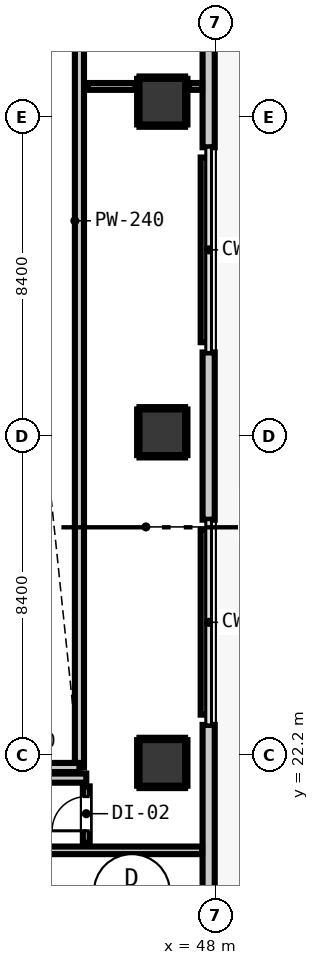
"""IFC4 building model, lengths in metres.
Left out: names, types, materials, properties, quantities, classifications, styles, units other than length and angle.
Written with IfcOpenShell. Run it as: python <this file> out.ifc"""

import sys

from ifc_helpers import new_model, si_unit, direction, frame, frame_2d, origin, origin_2d, place, context, subcontext, project, spatial, rectangle, circle, extrude, element, fill, save


model = new_model("IFC4")
c1 = context("Model", 3, precision=1e-05, world=origin(), true_north=direction((0.0, 1.0)))
c2 = subcontext(c1, "Body", "Model", "MODEL_VIEW")
j1 = project(units=[si_unit("LENGTHUNIT", "METRE"), si_unit("PLANEANGLEUNIT", "RADIAN")], contexts=[c1])
p1 = place(None, origin())
s1 = spatial("IfcSite", under=j1, at=p1, CompositionType="ELEMENT")
p2 = place(p1, origin())
s2 = spatial("IfcBuilding", under=s1, at=p2, CompositionType="ELEMENT")
p3 = place(p2, origin())
s3 = spatial("IfcBuildingStorey", under=s2, at=p3, CompositionType="ELEMENT", Elevation=0.0)
for number, where, z_axis, x_axis in (
    (1, (46.6, 22.0, 0.0), (0.0, 0.0, 1.0), (1.0, 0.0, 0.0)),
    (2, (46.6, 30.7, 0.0), (0.0, 0.0, 1.0), (1.0, 0.0, 0.0)),
    (3, (46.6, 39.4, 0.0), (0.0, 0.0, 1.0), (1.0, 0.0, 0.0)),
):
    element("IfcColumn", number, at=place(p3, frame(where, z_axis=z_axis, x_axis=x_axis)), inside=s3, PredefinedType="COLUMN", context=c2, shape_type="SweptSolid", body=[
        extrude(circle(Radius=0.6, at=origin_2d()), origin(), (0.0, 0.0, 1.0), 5.2),
    ])
p4 = place(p3, frame((47.82, 48.52, 0.0), z_axis=(0.0, 0.0, 1.0), x_axis=(0.0, -1.0, 0.0)))
e4 = element("IfcWall", 4, at=p4, inside=s3, PredefinedType="STANDARD", context=c2, shape_type="SweptSolid", body=[
    extrude(rectangle(XDim=10.32, YDim=0.32, at=frame_2d((5.16, 0.0))), origin(), (0.0, 0.0, 1.0), 4.92),
])
p5 = place(p3, frame((47.82, 32.8, 0.0), z_axis=(0.0, 0.0, 1.0), x_axis=(0.0, -1.0, 0.0)))
e5 = element("IfcWall", 5, at=p5, inside=s3, PredefinedType="STANDARD", context=c2, shape_type="SweptSolid", body=[
    extrude(rectangle(XDim=4.4, YDim=0.32, at=frame_2d((2.2, 0.0))), origin(), (0.0, 0.0, 1.0), 4.92),
])
p6 = place(p3, frame((47.82, 23.0, 0.0), z_axis=(0.0, 0.0, 1.0), x_axis=(0.0, -1.0, 0.0)))
e6 = element("IfcWall", 6, at=p6, inside=s3, PredefinedType="STANDARD", context=c2, shape_type="SweptSolid", body=[
    extrude(rectangle(XDim=10.32, YDim=0.32, at=frame_2d((5.16, 0.0))), origin(), (0.0, 0.0, 1.0), 4.92),
])
p7 = place(p6, frame((6.2, 0.0, 0.0)))
e7 = element("IfcOpeningElement", 7, at=p7, cuts=e6, PredefinedType="OPENING", context=c2, shape_type="SweptSolid", body=[
    extrude(rectangle(XDim=1.8, YDim=2.4, at=frame_2d((0.9, 1.2))), frame((0.0, 0.17, 0.0), z_axis=(0.0, -1.0, 0.0), x_axis=(1.0, 0.0, 0.0)), (0.0, 0.0, 1.0), 0.34),
])
p8 = place(p3, frame((44.42, 21.88, 0.0), z_axis=(0.0, 0.0, 1.0), x_axis=(0.0, 1.0, 0.0)))
e8 = element("IfcWall", 8, at=p8, inside=s3, PredefinedType="PARAPET", context=c2, shape_type="SweptSolid", body=[
    extrude(rectangle(XDim=28.77, YDim=0.24, at=frame_2d((14.385, 0.0))), origin(), (0.0, 0.0, 1.0), 1.2),
])
p9 = place(p3, frame((41.38, 21.88, 0.0), z_axis=(0.0, 0.0, 1.0), x_axis=(1.0, 0.0, 0.0)))
e9 = element("IfcWall", 9, at=p9, inside=s3, PredefinedType="PARAPET", context=c2, shape_type="SweptSolid", body=[
    extrude(rectangle(XDim=3.04, YDim=0.24, at=frame_2d((1.52, 0.0))), origin(), (0.0, 0.0, 1.0), 1.2),
])
p10 = place(p3, frame((44.6, 21.6, 0.0), z_axis=(0.0, 0.0, 1.0), x_axis=(-1.0, 0.0, 0.0)))
e10 = element("IfcWall", 10, at=p10, inside=s3, PredefinedType="PARTITIONING", context=c2, shape_type="SweptSolid", body=[
    extrude(rectangle(XDim=7.81, YDim=0.24, at=frame_2d((3.905, 0.0))), origin(), (0.0, 0.0, 1.0), 4.155),
])
p11 = place(p10, frame((5.65, 0.0, 0.0)))
e11 = element("IfcOpeningElement", 11, at=p11, cuts=e10, PredefinedType="OPENING", context=c2, shape_type="SweptSolid", body=[
    extrude(rectangle(XDim=1.4, YDim=2.15, at=frame_2d((0.7, 1.075))), frame((0.0, 0.13, 0.0), z_axis=(0.0, -1.0, 0.0), x_axis=(1.0, 0.0, 0.0)), (0.0, 0.0, 1.0), 0.26),
])
p12 = place(p3, frame((4.352, 19.7, 0.0), z_axis=(0.0, 0.0, 1.0), x_axis=(1.0, 0.0, 0.0)))
e12 = element("IfcWall", 12, at=p12, inside=s3, PredefinedType="PARTITIONING", context=c2, shape_type="SweptSolid", body=[
    extrude(rectangle(XDim=43.296, YDim=0.2, at=frame_2d((21.648, 0.0))), origin(), (0.0, 0.0, 1.0), 4.92),
])
p13 = place(p12, frame((19.823, 0.0, 0.0)))
e13 = element("IfcOpeningElement", 13, at=p13, cuts=e12, PredefinedType="OPENING", context=c2, shape_type="SweptSolid", body=[
    extrude(rectangle(XDim=1.4, YDim=2.15, at=frame_2d((0.7, 1.075))), frame((0.0, 0.11, 0.0), z_axis=(0.0, -1.0, 0.0), x_axis=(1.0, 0.0, 0.0)), (0.0, 0.0, 1.0), 0.22),
])
p14 = place(p12, frame((36.848, 0.0, 0.0)))
e14 = element("IfcOpeningElement", 14, at=p14, cuts=e12, PredefinedType="OPENING", context=c2, shape_type="SweptSolid", body=[
    extrude(rectangle(XDim=1.4, YDim=2.15, at=frame_2d((0.7, 1.075))), frame((0.0, 0.11, 0.0), z_axis=(0.0, -1.0, 0.0), x_axis=(1.0, 0.0, 0.0)), (0.0, 0.0, 1.0), 0.22),
])
p15 = place(p3, frame((44.638, 39.8, 0.0), z_axis=(0.0, 0.0, 1.0), x_axis=(1.0, 0.0, 0.0)))
e15 = element("IfcWall", 15, at=p15, inside=s3, PredefinedType="PARTITIONING", context=c2, shape_type="SweptSolid", body=[
    extrude(rectangle(XDim=1.26, YDim=0.18, at=frame_2d((0.63, 0.0))), origin(), (0.0, 0.0, 1.0), 4.155),
])
p16 = place(p3, frame((47.302, 39.8, 0.0), z_axis=(0.0, 0.0, 1.0), x_axis=(1.0, 0.0, 0.0)))
e16 = element("IfcWall", 16, at=p16, inside=s3, PredefinedType="PARTITIONING", context=c2, shape_type="SweptSolid", body=[
    extrude(rectangle(XDim=0.346, YDim=0.18, at=frame_2d((0.173, 0.0))), origin(), (0.0, 0.0, 1.0), 4.92),
])
p17 = place(p3, frame((44.6, 19.898, 0.0), z_axis=(0.0, 0.0, 1.0), x_axis=(0.0, 1.0, 0.0)))
e17 = element("IfcWall", 17, at=p17, inside=s3, PredefinedType="PARTITIONING", context=c2, shape_type="SweptSolid", body=[
    extrude(rectangle(XDim=1.484, YDim=0.18, at=frame_2d((0.742, 0.0))), origin(), (0.0, 0.0, 1.0), 4.92),
])
p18 = place(p17, frame((0.316, 0.0, 0.0)))
e18 = element("IfcOpeningElement", 18, at=p18, cuts=e17, PredefinedType="OPENING", context=c2, shape_type="SweptSolid", body=[
    extrude(rectangle(XDim=0.9, YDim=2.1, at=frame_2d((0.45, 1.05))), frame((0.0, 0.1, 0.0), z_axis=(0.0, -1.0, 0.0), x_axis=(1.0, 0.0, 0.0)), (0.0, 0.0, 1.0), 0.2),
])
for number, where, z_axis, x_axis in (
    (19, (47.7, 23.27, 0.0), (0.0, 0.0, 1.0), (0.0, 1.0, 0.0)),
    (20, (47.7, 33.07, 0.0), (0.0, 0.0, 1.0), (0.0, 1.0, 0.0)),
):
    element("IfcWall", number, at=place(p3, frame(where, z_axis=z_axis, x_axis=x_axis)), inside=s3, PredefinedType="PARTITIONING", context=c2, shape_type="SweptSolid", body=[
        extrude(rectangle(XDim=4.86, YDim=0.18, at=frame_2d((2.43, 0.0))), origin(), (0.0, 0.0, 1.0), 4.92),
    ])
for number, where, z_axis, x_axis in (
    (21, (46.0, 21.368, 0.0), (0.0, 0.0, 1.0), (1.0, 0.0, 0.0)),
    (22, (46.0, 22.632, 0.0), (0.0, 0.0, 1.0), (1.0, 0.0, 0.0)),
):
    element("IfcWall", number, at=place(p3, frame(where, z_axis=z_axis, x_axis=x_axis)), inside=s3, PredefinedType="PARTITIONING", context=c2, shape_type="SweptSolid", body=[
        extrude(rectangle(XDim=1.2, YDim=0.06, at=frame_2d((0.6, 0.0))), origin(), (0.0, 0.0, 1.0), 1.45),
    ])
for number, where, z_axis, x_axis in (
    (23, (45.968, 21.4, 0.0), (0.0, 0.0, 1.0), (0.0, 1.0, 0.0)),
    (24, (47.232, 21.4, 0.0), (0.0, 0.0, 1.0), (0.0, 1.0, 0.0)),
):
    element("IfcWall", number, at=place(p3, frame(where, z_axis=z_axis, x_axis=x_axis)), inside=s3, PredefinedType="PARTITIONING", context=c2, shape_type="SweptSolid", body=[
        extrude(rectangle(XDim=1.2, YDim=0.06, at=frame_2d((0.6, 0.0))), origin(), (0.0, 0.0, 1.0), 1.45),
    ])
for number, where, z_axis, x_axis in (
    (25, (46.0, 30.068, 0.0), (0.0, 0.0, 1.0), (1.0, 0.0, 0.0)),
    (26, (46.0, 31.332, 0.0), (0.0, 0.0, 1.0), (1.0, 0.0, 0.0)),
    (27, (45.968, 30.1, 0.0), (0.0, 0.0, 1.0), (0.0, 1.0, 0.0)),
    (28, (47.232, 30.1, 0.0), (0.0, 0.0, 1.0), (0.0, 1.0, 0.0)),
    (29, (46.0, 38.768, 0.0), (0.0, 0.0, 1.0), (1.0, 0.0, 0.0)),
    (30, (46.0, 40.032, 0.0), (0.0, 0.0, 1.0), (1.0, 0.0, 0.0)),
    (31, (45.968, 38.8, 0.0), (0.0, 0.0, 1.0), (0.0, 1.0, 0.0)),
    (32, (47.232, 38.8, 0.0), (0.0, 0.0, 1.0), (0.0, 1.0, 0.0)),
):
    element("IfcWall", number, at=place(p3, frame(where, z_axis=z_axis, x_axis=x_axis)), inside=s3, PredefinedType="PARTITIONING", context=c2, shape_type="SweptSolid", body=[
        extrude(rectangle(XDim=1.2, YDim=0.06, at=frame_2d((0.6, 0.0))), origin(), (0.0, 0.0, 1.0), 1.45),
    ])
p19 = place(p18, origin())
e33 = element("IfcDoor", 33, at=p19, inside=s3, OperationType="SINGLE_SWING_LEFT", PredefinedType="DOOR", context=c2, shape_type="SweptSolid", body=[
    extrude(rectangle(XDim=0.9, YDim=2.1, at=frame_2d((0.45, 1.05))), frame((0.0, 0.025, 0.0), z_axis=(0.0, -1.0, 0.0), x_axis=(1.0, 0.0, 0.0)), (0.0, 0.0, 1.0), 0.05),
])
fill(e18, e33)
save(model, sys.argv[1])
